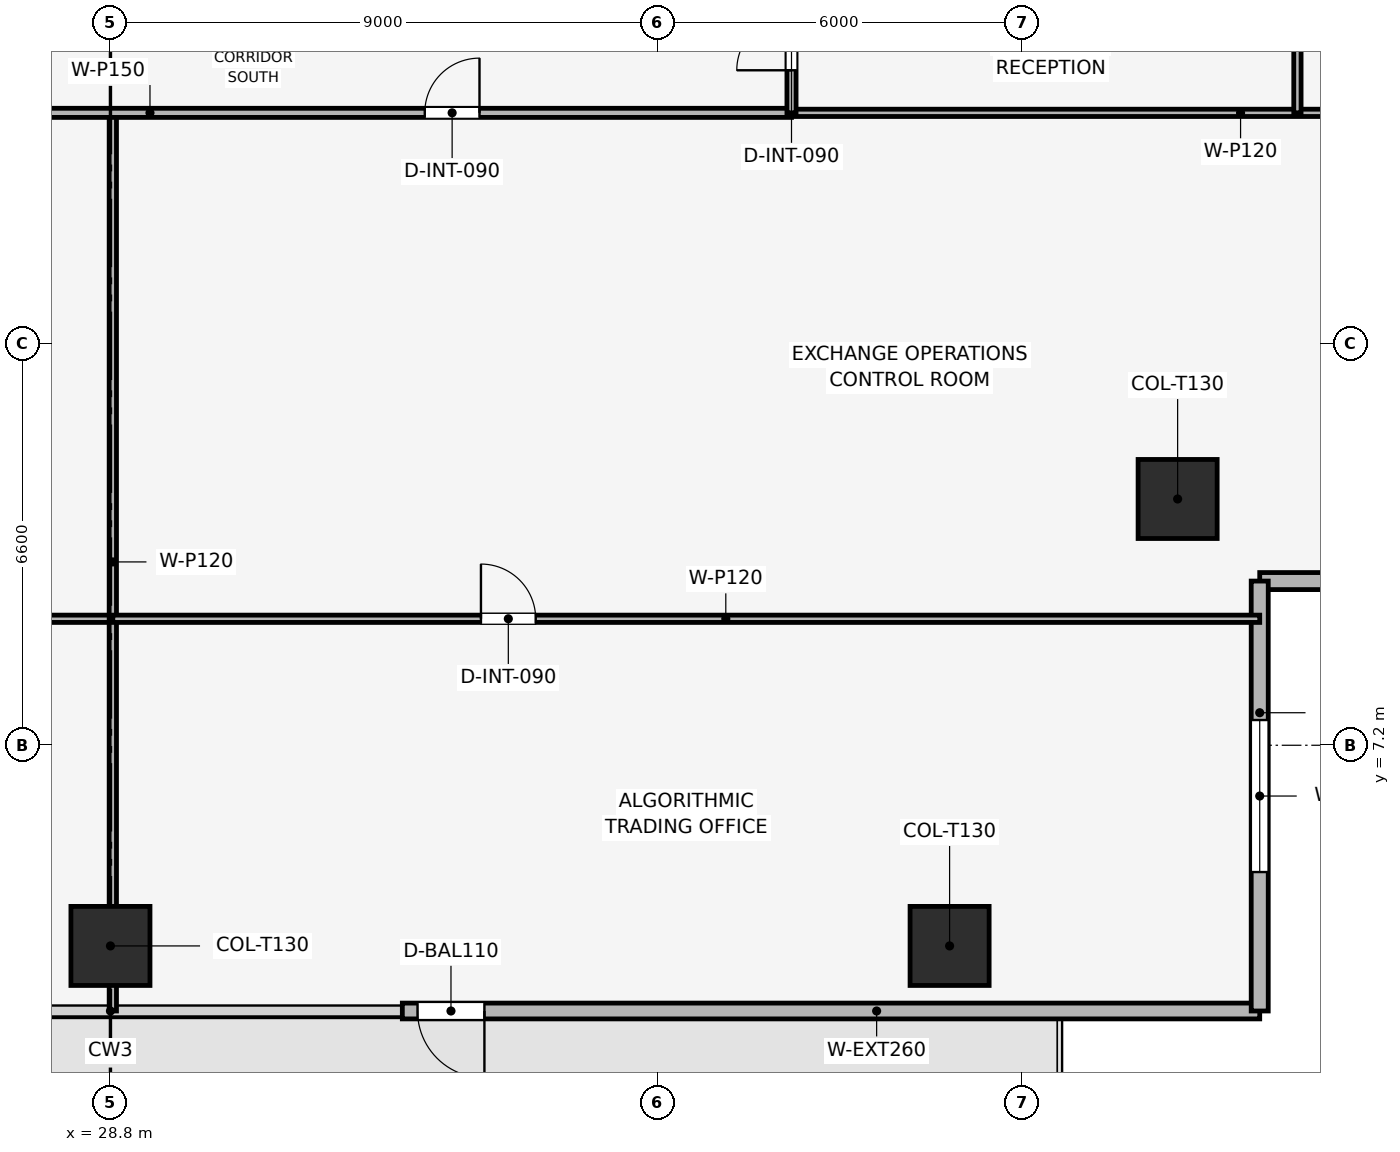
"""IFC4 building model, lengths in metres.
Left out: names, types, materials, properties, quantities, classifications, styles, units other than length and angle.
Written with IfcOpenShell. Run it as: python <this file> out.ifc"""

import sys

from ifc_helpers import new_model, si_unit, direction, frame, frame_2d, origin, origin_2d, place, context, subcontext, project, spatial, rectangle, extrude, element, fill, save


model = new_model("IFC4")
c1 = context("Model", 3, precision=1e-05, world=origin(), true_north=direction((0.0, 1.0)))
c2 = subcontext(c1, "Body", "Model", "MODEL_VIEW")
j1 = project(units=[si_unit("LENGTHUNIT", "METRE"), si_unit("PLANEANGLEUNIT", "RADIAN")], contexts=[c1])
p1 = place(None, origin())
s1 = spatial("IfcSite", under=j1, at=p1, CompositionType="ELEMENT")
p2 = place(p1, origin())
s2 = spatial("IfcBuilding", under=s1, at=p2, CompositionType="ELEMENT")
p3 = place(p2, frame((0.0, 0.0, 121.2)))
s3 = spatial("IfcBuildingStorey", under=s2, at=p3, CompositionType="ELEMENT", Elevation=121.2)
for number, where, z_axis, x_axis in (
    (1, (28.8, 3.9, 0.003), (0.0, 0.0, 1.0), (1.0, 0.0, 0.0)),
    (2, (42.6, 3.9, 0.003), (0.0, 0.0, 1.0), (1.0, 0.0, 0.0)),
    (3, (46.35, 11.25, 0.003), (0.0, 0.0, 1.0), (1.0, 0.0, 0.0)),
):
    element("IfcColumn", number, at=place(p3, frame(where, z_axis=z_axis, x_axis=x_axis)), inside=s3, PredefinedType="COLUMN", context=c2, shape_type="SweptSolid", body=[
        extrude(rectangle(XDim=1.3, YDim=1.3, at=origin_2d()), origin(), (0.0, 0.0, 1.0), 3.644),
    ])
p4 = place(p3, frame((47.7, 2.83, 0.0), z_axis=(0.0, 0.0, 1.0), x_axis=(-1.0, 0.0, 0.0)))
e4 = element("IfcWall", 4, at=p4, inside=s3, PredefinedType="SOLIDWALL", context=c2, shape_type="SweptSolid", body=[
    extrude(rectangle(XDim=14.1, YDim=0.26, at=frame_2d((7.05, 0.0))), origin(), (0.0, 0.0, 1.0), 3.65),
])
p5 = place(p4, frame((12.75, 0.0, 0.0)))
e5 = element("IfcOpeningElement", 5, at=p5, cuts=e4, PredefinedType="OPENING", context=c2, shape_type="SweptSolid", body=[
    extrude(rectangle(XDim=1.1, YDim=2.2, at=frame_2d((0.55, 1.1))), frame((0.0, 0.14, 0.0), z_axis=(0.0, -1.0, 0.0), x_axis=(1.0, 0.0, 0.0)), (0.0, 0.0, 1.0), 0.28),
])
p6 = place(p3, frame((54.77, 9.9, 0.0), z_axis=(0.0, 0.0, 1.0), x_axis=(-1.0, 0.0, 0.0)))
e6 = element("IfcWall", 6, at=p6, inside=s3, PredefinedType="SOLIDWALL", context=c2, shape_type="SweptSolid", body=[
    extrude(rectangle(XDim=7.07, YDim=0.28, at=frame_2d((3.535, 0.0))), origin(), (0.0, 0.0, 1.0), 3.65),
])
p7 = place(p6, frame((2.285, 0.0, 0.9)))
e7 = element("IfcOpeningElement", 7, at=p7, cuts=e6, PredefinedType="OPENING", context=c2, shape_type="SweptSolid", body=[
    extrude(rectangle(XDim=2.5, YDim=1.9, at=frame_2d((1.25, 0.95))), frame((0.0, 0.15, 0.0), z_axis=(0.0, -1.0, 0.0), x_axis=(1.0, 0.0, 0.0)), (0.0, 0.0, 1.0), 0.3),
])
p8 = place(p3, frame((47.7, 9.9, 0.0), z_axis=(0.0, 0.0, 1.0), x_axis=(0.0, -1.0, 0.0)))
e8 = element("IfcWall", 8, at=p8, inside=s3, PredefinedType="SOLIDWALL", context=c2, shape_type="SweptSolid", body=[
    extrude(rectangle(XDim=7.07, YDim=0.28, at=frame_2d((3.535, 0.0))), origin(), (0.0, 0.0, 1.0), 3.65),
])
p9 = place(p8, frame((2.285, 0.0, 0.9)))
e9 = element("IfcOpeningElement", 9, at=p9, cuts=e8, PredefinedType="OPENING", context=c2, shape_type="SweptSolid", body=[
    extrude(rectangle(XDim=2.5, YDim=1.9, at=frame_2d((1.25, 0.95))), frame((0.0, 0.15, 0.0), z_axis=(0.0, -1.0, 0.0), x_axis=(1.0, 0.0, 0.0)), (0.0, 0.0, 1.0), 0.3),
])
p10 = place(p3, frame((20.108, 9.28, 0.0), z_axis=(0.0, 0.0, 1.0), x_axis=(1.0, 0.0, 0.0)))
e10 = element("IfcWall", 10, at=p10, inside=s3, PredefinedType="PARTITIONING", context=c2, shape_type="SweptSolid", body=[
    extrude(rectangle(XDim=8.731, YDim=0.12, at=frame_2d((4.366, 0.0))), origin(), (0.0, 0.0, 1.0), 3.185),
])
p11 = place(p10, frame((1.438, 0.0, 0.0)))
e11 = element("IfcOpeningElement", 11, at=p11, cuts=e10, PredefinedType="OPENING", context=c2, shape_type="SweptSolid", body=[
    extrude(rectangle(XDim=0.9, YDim=2.1, at=frame_2d((0.45, 1.05))), frame((0.0, 0.07, 0.0), z_axis=(0.0, -1.0, 0.0), x_axis=(1.0, 0.0, 0.0)), (0.0, 0.0, 1.0), 0.14),
])
p12 = place(p3, frame((28.839, 2.83, 0.0), z_axis=(0.0, 0.0, 1.0), x_axis=(0.0, 1.0, 0.0)))
e12 = element("IfcWall", 12, at=p12, inside=s3, PredefinedType="PARTITIONING", context=c2, shape_type="SweptSolid", body=[
    extrude(rectangle(XDim=14.77, YDim=0.12, at=frame_2d((7.385, 0.0))), origin(), (0.0, 0.0, 1.0), 3.135),
])
p13 = place(p3, frame((28.839, 9.28, 0.0), z_axis=(0.0, 0.0, 1.0), x_axis=(1.0, 0.0, 0.0)))
e13 = element("IfcWall", 13, at=p13, inside=s3, PredefinedType="PARTITIONING", context=c2, shape_type="SweptSolid", body=[
    extrude(rectangle(XDim=18.861, YDim=0.12, at=frame_2d((9.43, 0.0))), origin(), (0.0, 0.0, 1.0), 3.035),
])
p14 = place(p13, frame((6.054, 0.0, 0.0)))
e14 = element("IfcOpeningElement", 14, at=p14, cuts=e13, PredefinedType="OPENING", context=c2, shape_type="SweptSolid", body=[
    extrude(rectangle(XDim=0.9, YDim=2.1, at=frame_2d((0.45, 1.05))), frame((0.0, 0.07, 0.0), z_axis=(0.0, -1.0, 0.0), x_axis=(1.0, 0.0, 0.0)), (0.0, 0.0, 1.0), 0.14),
])
p15 = place(p3, frame((40.0, 17.6, 0.0), z_axis=(0.0, 0.0, 1.0), x_axis=(1.0, 0.0, 0.0)))
e15 = element("IfcWall", 15, at=p15, inside=s3, PredefinedType="PARTITIONING", context=c2, shape_type="SweptSolid", body=[
    extrude(rectangle(XDim=14.77, YDim=0.12, at=frame_2d((7.385, 0.0))), origin(), (0.0, 0.0, 1.0), 3.035),
])
p16 = place(p3, frame((48.32, 17.6, 0.0), z_axis=(0.0, 0.0, 1.0), x_axis=(0.0, 1.0, 0.0)))
e16 = element("IfcWall", 16, at=p16, inside=s3, PredefinedType="PARTITIONING", context=c2, shape_type="SweptSolid", body=[
    extrude(rectangle(XDim=2.3, YDim=0.12, at=frame_2d((1.15, 0.0))), origin(), (0.0, 0.0, 1.0), 3.65),
])
p17 = place(p16, frame((1.2, 0.0, 0.0)))
e17 = element("IfcOpeningElement", 17, at=p17, cuts=e16, PredefinedType="OPENING", context=c2, shape_type="SweptSolid", body=[
    extrude(rectangle(XDim=0.9, YDim=2.1, at=frame_2d((0.45, 1.05))), frame((0.0, 0.07, 0.0), z_axis=(0.0, -1.0, 0.0), x_axis=(1.0, 0.0, 0.0)), (0.0, 0.0, 1.0), 0.14),
])
p18 = place(p3, frame((17.6, 17.6, 0.0), z_axis=(0.0, 0.0, 1.0), x_axis=(1.0, 0.0, 0.0)))
e18 = element("IfcWall", 18, at=p18, inside=s3, PredefinedType="PARTITIONING", context=c2, shape_type="SweptSolid", body=[
    extrude(rectangle(XDim=22.4, YDim=0.15, at=frame_2d((11.2, 0.0))), origin(), (0.0, 0.0, 1.0), 3.185),
])
p19 = place(p18, frame((0.804, 0.0, 0.0)))
e19 = element("IfcOpeningElement", 19, at=p19, cuts=e18, PredefinedType="OPENING", context=c2, shape_type="SweptSolid", body=[
    extrude(rectangle(XDim=0.9, YDim=2.1, at=frame_2d((0.45, 1.05))), frame((0.0, 0.085, 0.0), z_axis=(0.0, -1.0, 0.0), x_axis=(1.0, 0.0, 0.0)), (0.0, 0.0, 1.0), 0.17),
])
p20 = place(p18, frame((6.424, 0.0, 0.0)))
e20 = element("IfcOpeningElement", 20, at=p20, cuts=e18, PredefinedType="OPENING", context=c2, shape_type="SweptSolid", body=[
    extrude(rectangle(XDim=0.9, YDim=2.1, at=frame_2d((0.45, 1.05))), frame((0.0, 0.085, 0.0), z_axis=(0.0, -1.0, 0.0), x_axis=(1.0, 0.0, 0.0)), (0.0, 0.0, 1.0), 0.17),
])
p21 = place(p18, frame((16.369, 0.0, 0.0)))
e21 = element("IfcOpeningElement", 21, at=p21, cuts=e18, PredefinedType="OPENING", context=c2, shape_type="SweptSolid", body=[
    extrude(rectangle(XDim=0.9, YDim=2.1, at=frame_2d((0.45, 1.05))), frame((0.0, 0.085, 0.0), z_axis=(0.0, -1.0, 0.0), x_axis=(1.0, 0.0, 0.0)), (0.0, 0.0, 1.0), 0.17),
])
p22 = place(p3, frame((40.0, 17.6, 0.0), z_axis=(0.0, 0.0, 1.0), x_axis=(0.0, 1.0, 0.0)))
e22 = element("IfcWall", 22, at=p22, inside=s3, PredefinedType="PARTITIONING", context=c2, shape_type="SweptSolid", body=[
    extrude(rectangle(XDim=22.4, YDim=0.15, at=frame_2d((11.2, 0.0))), origin(), (0.0, 0.0, 1.0), 3.185),
])
p23 = place(p22, frame((0.7, 0.0, 0.0)))
e23 = element("IfcOpeningElement", 23, at=p23, cuts=e22, PredefinedType="OPENING", context=c2, shape_type="SweptSolid", body=[
    extrude(rectangle(XDim=0.9, YDim=2.1, at=frame_2d((0.45, 1.05))), frame((0.0, 0.085, 0.0), z_axis=(0.0, -1.0, 0.0), x_axis=(1.0, 0.0, 0.0)), (0.0, 0.0, 1.0), 0.17),
])
p24 = place(p22, frame((6.378, 0.0, 0.0)))
e24 = element("IfcOpeningElement", 24, at=p24, cuts=e22, PredefinedType="OPENING", context=c2, shape_type="SweptSolid", body=[
    extrude(rectangle(XDim=0.9, YDim=2.1, at=frame_2d((0.45, 1.05))), frame((0.0, 0.085, 0.0), z_axis=(0.0, -1.0, 0.0), x_axis=(1.0, 0.0, 0.0)), (0.0, 0.0, 1.0), 0.17),
])
p25 = place(p22, frame((16.428, 0.0, 0.0)))
e25 = element("IfcOpeningElement", 25, at=p25, cuts=e22, PredefinedType="OPENING", context=c2, shape_type="SweptSolid", body=[
    extrude(rectangle(XDim=0.9, YDim=2.1, at=frame_2d((0.45, 1.05))), frame((0.0, 0.085, 0.0), z_axis=(0.0, -1.0, 0.0), x_axis=(1.0, 0.0, 0.0)), (0.0, 0.0, 1.0), 0.17),
])
p26 = place(p5, origin())
e26 = element("IfcDoor", 26, at=p26, inside=s3, OperationType="SINGLE_SWING_LEFT", PredefinedType="DOOR", context=c2, shape_type="SweptSolid", body=[
    extrude(rectangle(XDim=1.1, YDim=2.2, at=frame_2d((0.55, 1.1))), frame((0.0, 0.025, 0.0), z_axis=(0.0, -1.0, 0.0), x_axis=(1.0, 0.0, 0.0)), (0.0, 0.0, 1.0), 0.05),
])
fill(e5, e26)
p27 = place(p9, origin())
e27 = element("IfcWindow", 27, at=p27, inside=s3, PartitioningType="SINGLE_PANEL", PredefinedType="WINDOW", context=c2, shape_type="SweptSolid", body=[
    extrude(rectangle(XDim=2.5, YDim=1.9, at=frame_2d((1.25, 0.95))), frame((0.0, 0.03, 0.0), z_axis=(0.0, -1.0, 0.0), x_axis=(1.0, 0.0, 0.0)), (0.0, 0.0, 1.0), 0.06),
])
fill(e9, e27)
p28 = place(p14, origin())
e28 = element("IfcDoor", 28, at=p28, inside=s3, OperationType="SINGLE_SWING_LEFT", PredefinedType="DOOR", context=c2, shape_type="SweptSolid", body=[
    extrude(rectangle(XDim=0.9, YDim=2.1, at=frame_2d((0.45, 1.05))), frame((0.0, 0.025, 0.0), z_axis=(0.0, -1.0, 0.0), x_axis=(1.0, 0.0, 0.0)), (0.0, 0.0, 1.0), 0.05),
])
fill(e14, e28)
p29 = place(p21, origin())
e29 = element("IfcDoor", 29, at=p29, inside=s3, OperationType="SINGLE_SWING_RIGHT", PredefinedType="DOOR", context=c2, shape_type="SweptSolid", body=[
    extrude(rectangle(XDim=0.9, YDim=2.1, at=frame_2d((0.45, 1.05))), frame((0.0, 0.025, 0.0), z_axis=(0.0, -1.0, 0.0), x_axis=(1.0, 0.0, 0.0)), (0.0, 0.0, 1.0), 0.05),
])
fill(e21, e29)
p30 = place(p23, origin())
e30 = element("IfcDoor", 30, at=p30, inside=s3, OperationType="SINGLE_SWING_LEFT", PredefinedType="DOOR", context=c2, shape_type="SweptSolid", body=[
    extrude(rectangle(XDim=0.9, YDim=2.1, at=frame_2d((0.45, 1.05))), frame((0.0, 0.025, 0.0), z_axis=(0.0, -1.0, 0.0), x_axis=(1.0, 0.0, 0.0)), (0.0, 0.0, 1.0), 0.05),
])
fill(e23, e30)
save(model, sys.argv[1])
